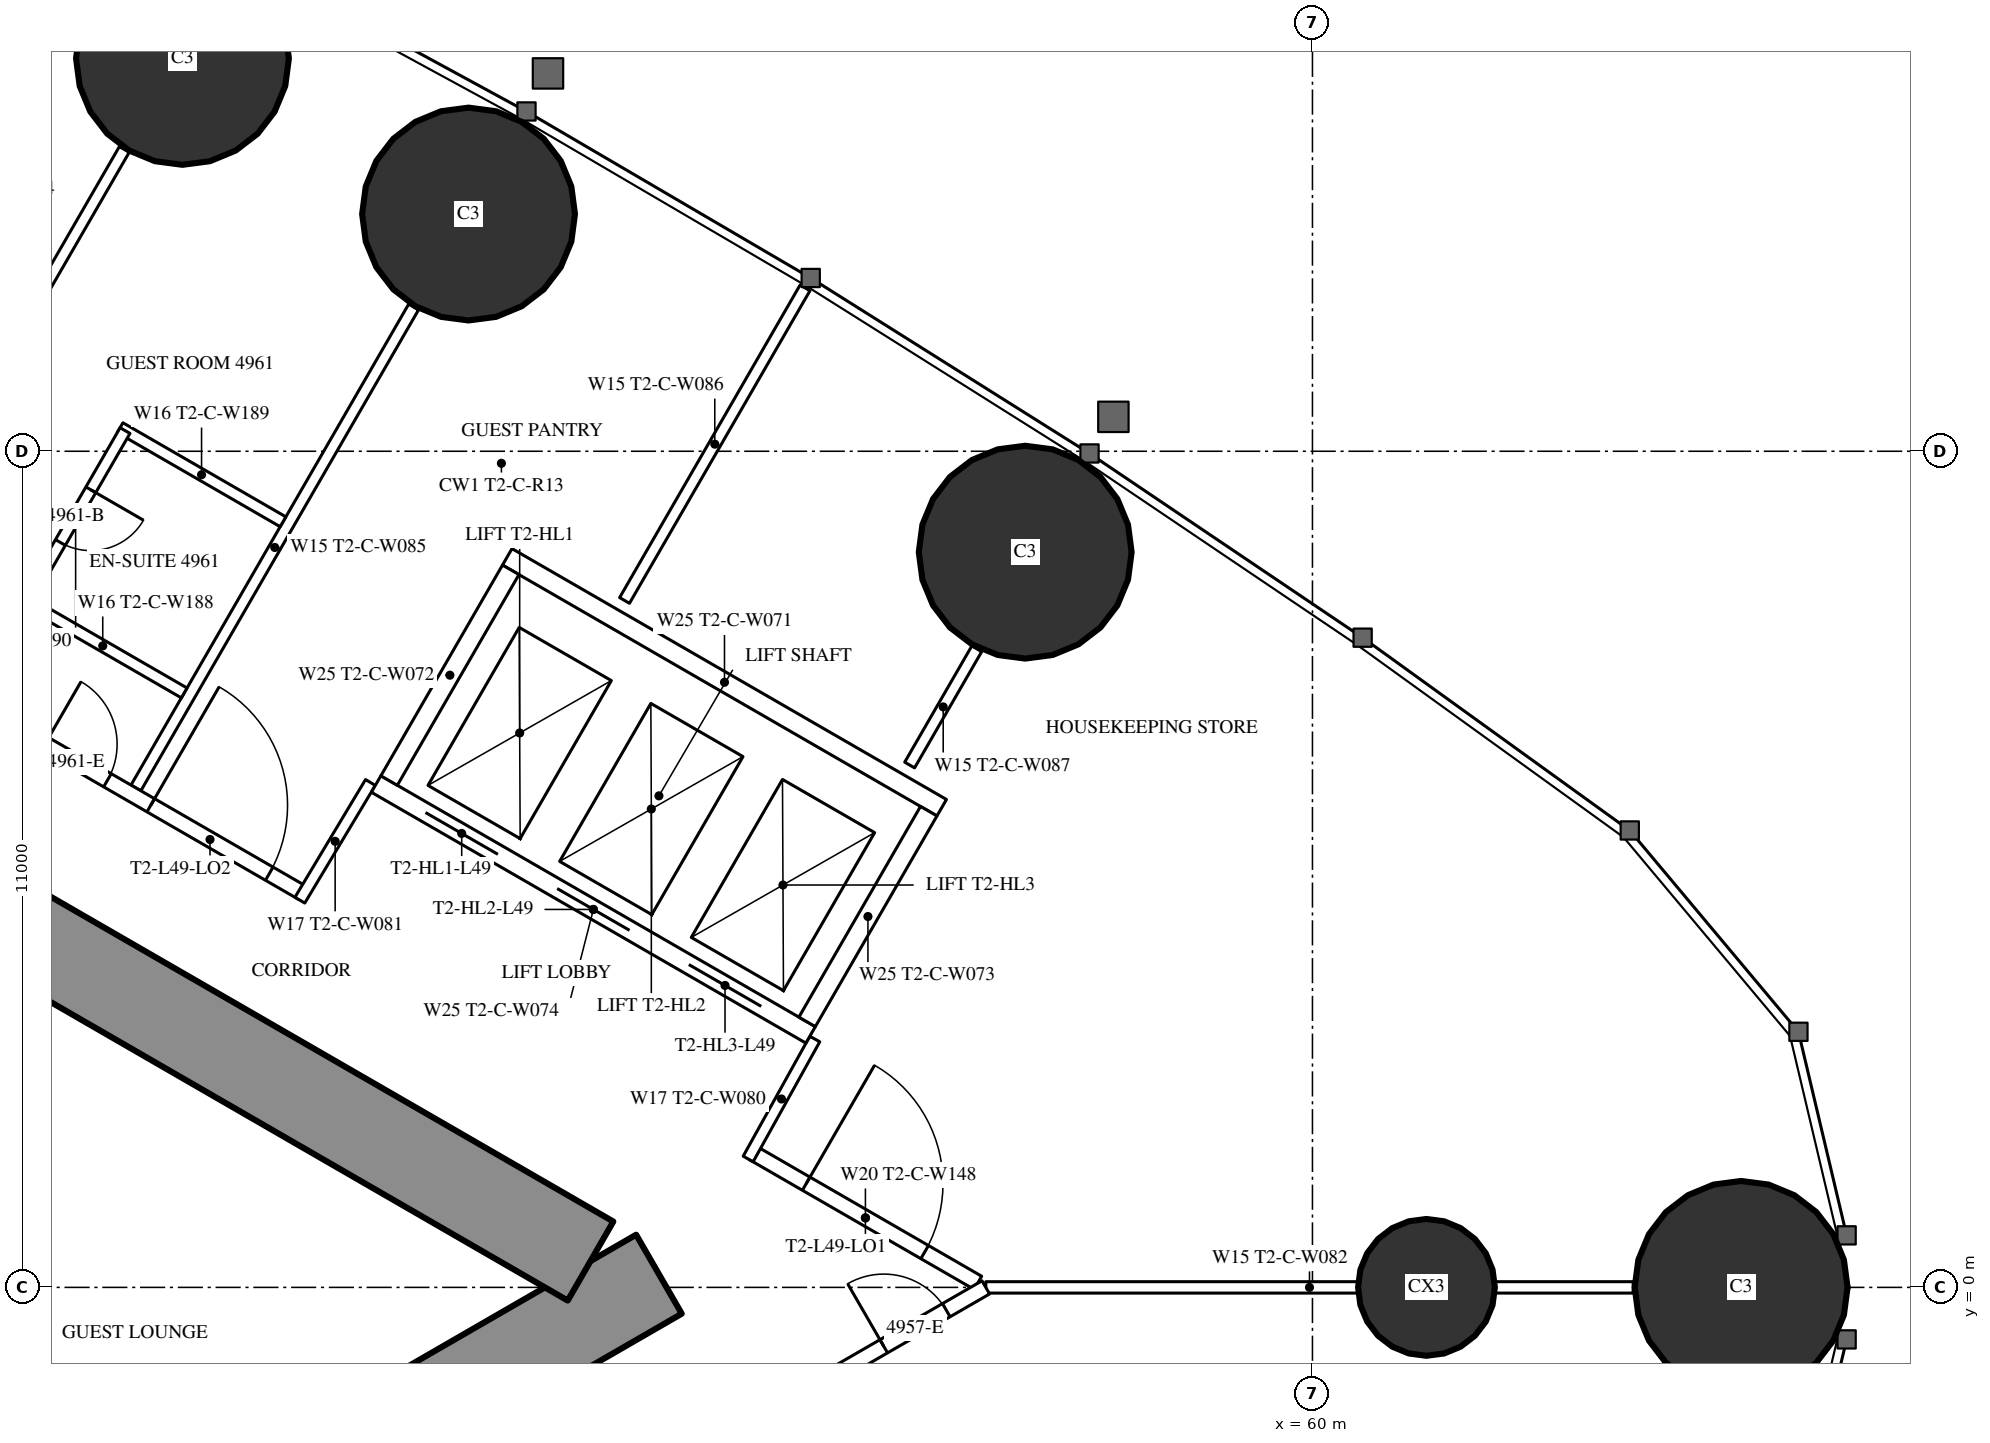
"""IFC4 building model, lengths in metres.
Left out: names, types, materials, properties, quantities, classifications, styles, units other than length and angle.
Written with IfcOpenShell. Run it as: python <this file> out.ifc"""

import sys

from ifc_helpers import new_model, si_unit, direction, frame, frame_2d, origin, origin_2d, place, context, subcontext, project, spatial, rectangle, circle, extrude, element, fill, save


model = new_model("IFC4")
c1 = context("Model", 3, precision=1e-05, world=origin(), true_north=direction((0.0, 1.0)))
c2 = subcontext(c1, "Body", "Model", "MODEL_VIEW")
j1 = project(units=[si_unit("LENGTHUNIT", "METRE"), si_unit("PLANEANGLEUNIT", "RADIAN")], contexts=[c1])
p1 = place(None, origin())
s1 = spatial("IfcSite", under=j1, at=p1, CompositionType="ELEMENT")
p2 = place(p1, origin())
s2 = spatial("IfcBuilding", under=s1, at=p2, CompositionType="ELEMENT")
p3 = place(p2, frame((0.0, 0.0, 184.3)))
s3 = spatial("IfcBuildingStorey", under=s2, at=p3, CompositionType="ELEMENT", Elevation=184.3)
for number, where, z_axis, x_axis in (
    (1, (65.64, 0.0, 0.0), (0.0, 0.0, 1.0), (1.0, 0.0, 0.0)),
    (2, (56.221, 9.672, 0.0), (0.0, 0.0, 1.0), (1.0, 0.0, 0.0)),
    (3, (48.897, 14.121, 0.0), (0.0, 0.0, 1.0), (1.0, 0.0, 0.0)),
    (4, (45.134, 16.168, 0.0), (0.0, 0.0, 1.0), (1.0, 0.0, 0.0)),
):
    element("IfcColumn", number, at=place(p3, frame(where, z_axis=z_axis, x_axis=x_axis)), inside=s3, PredefinedType="COLUMN", context=c2, shape_type="SweptSolid", body=[
        extrude(circle(Radius=1.4, at=origin_2d()), origin(), (0.0, 0.0, 1.0), 3.5),
    ])
p4 = place(p3, frame((61.5, 0.0, 0.0), z_axis=(0.0, 0.0, 1.0), x_axis=(1.0, 0.0, 0.0)))
e5 = element("IfcColumn", 5, at=p4, inside=s3, PredefinedType="COLUMN", context=c2, shape_type="SweptSolid", body=[
    extrude(circle(Radius=0.9, at=origin_2d()), origin(), (0.0, 0.0, 1.0), 3.5),
])
p5 = place(p3, frame((27.2, -13.8, 0.0), z_axis=(0.0, 0.0, 1.0), x_axis=(0.866027159892, 0.499996958321, 0.0)))
e6 = element("IfcWall", 6, at=p5, inside=s3, PredefinedType="SHEAR", context=c2, shape_type="SweptSolid", body=[
    extrude(rectangle(XDim=27.947, YDim=1.2, at=frame_2d((13.973, 0.0))), origin(), (0.0, 0.0, 1.0), 3.5),
])
p6 = place(p5, frame((4.6, 0.0, 0.0)))
e7 = element("IfcOpeningElement", 7, at=p6, cuts=e6, PredefinedType="OPENING", context=c2, shape_type="SweptSolid", body=[
    extrude(rectangle(XDim=1.0, YDim=2.2, at=frame_2d((0.5, 1.1))), frame((0.0, 0.61, 0.0), z_axis=(0.0, -1.0, 0.0), x_axis=(1.0, 0.0, 0.0)), (0.0, 0.0, 1.0), 1.22),
])
p7 = place(p5, frame((13.395, 0.0, 0.0)))
e8 = element("IfcOpeningElement", 8, at=p7, cuts=e6, PredefinedType="OPENING", context=c2, shape_type="SweptSolid", body=[
    extrude(rectangle(XDim=1.8, YDim=2.2, at=frame_2d((0.9, 1.1))), frame((0.0, 0.61, 0.0), z_axis=(0.0, -1.0, 0.0), x_axis=(1.0, 0.0, 0.0)), (0.0, 0.0, 1.0), 1.22),
])
p8 = place(p3, frame((27.2, 13.8, 0.0), z_axis=(0.0, 0.0, 1.0), x_axis=(0.866024515034, -0.500001539357, 0.0)))
e9 = element("IfcWall", 9, at=p8, inside=s3, PredefinedType="SHEAR", context=c2, shape_type="SweptSolid", body=[
    extrude(rectangle(XDim=26.907, YDim=1.2, at=frame_2d((13.454, 0.0))), origin(), (0.0, 0.0, 1.0), 3.5),
])
p9 = place(p8, frame((4.6, 0.0, 0.0)))
e10 = element("IfcOpeningElement", 10, at=p9, cuts=e9, PredefinedType="OPENING", context=c2, shape_type="SweptSolid", body=[
    extrude(rectangle(XDim=1.0, YDim=2.2, at=frame_2d((0.5, 1.1))), frame((0.0, 0.61, 0.0), z_axis=(0.0, -1.0, 0.0), x_axis=(1.0, 0.0, 0.0)), (0.0, 0.0, 1.0), 1.22),
])
p10 = place(p8, frame((13.395, 0.0, 0.0)))
e11 = element("IfcOpeningElement", 11, at=p10, cuts=e9, PredefinedType="OPENING", context=c2, shape_type="SweptSolid", body=[
    extrude(rectangle(XDim=1.8, YDim=2.2, at=frame_2d((0.9, 1.1))), frame((0.0, 0.61, 0.0), z_axis=(0.0, -1.0, 0.0), x_axis=(1.0, 0.0, 0.0)), (0.0, 0.0, 1.0), 1.22),
])
p11 = place(p3, frame((40.769, 8.737, 0.0), z_axis=(0.0, 0.0, 1.0), x_axis=(0.500013115284, 0.866017831539, 0.0)))
e12 = element("IfcWall", 12, at=p11, inside=s3, PredefinedType="PARTITIONING", context=c2, shape_type="SweptSolid", body=[
    extrude(rectangle(XDim=7.198, YDim=0.15, at=frame_2d((3.599, 0.0))), origin(), (0.0, 0.0, 1.0), 2.3),
])
p12 = place(p3, frame((44.521, 6.571, 0.0), z_axis=(0.0, 0.0, 1.0), x_axis=(0.500020376429, 0.866013639128, 0.0)))
e13 = element("IfcWall", 13, at=p12, inside=s3, PredefinedType="PARTITIONING", context=c2, shape_type="SweptSolid", body=[
    extrude(rectangle(XDim=7.306, YDim=0.15, at=frame_2d((3.653, 0.0))), origin(), (0.0, 0.0, 1.0), 2.3),
])
p13 = place(p3, frame((55.702, 0.0, 0.0), z_axis=(0.0, 0.0, 1.0), x_axis=(1.0, 0.0, 0.0)))
e14 = element("IfcWall", 14, at=p13, inside=s3, PredefinedType="PARTITIONING", context=c2, shape_type="SweptSolid", body=[
    extrude(rectangle(XDim=8.518, YDim=0.15, at=frame_2d((4.259, 0.0))), origin(), (0.0, 0.0, 1.0), 2.3),
])
p14 = place(p3, frame((50.95, 9.037, 0.0), z_axis=(0.0, 0.0, 1.0), x_axis=(0.499988022762, 0.866032318735, 0.0)))
e15 = element("IfcWall", 15, at=p14, inside=s3, PredefinedType="PARTITIONING", context=c2, shape_type="SweptSolid", body=[
    extrude(rectangle(XDim=4.748, YDim=0.15, at=frame_2d((2.374, 0.0))), origin(), (0.0, 0.0, 1.0), 3.25),
])
p15 = place(p3, frame((54.7, 6.872, 0.0), z_axis=(0.0, 0.0, 1.0), x_axis=(0.499989690894, 0.866031355668, 0.0)))
e16 = element("IfcWall", 16, at=p15, inside=s3, PredefinedType="PARTITIONING", context=c2, shape_type="SweptSolid", body=[
    extrude(rectangle(XDim=1.766, YDim=0.15, at=frame_2d((0.883, 0.0))), origin(), (0.0, 0.0, 1.0), 3.25),
])
p16 = place(p3, frame((27.959, 16.017, 0.0), z_axis=(0.0, 0.0, 1.0), x_axis=(0.866027146794, -0.499996981007, 0.0)))
e17 = element("IfcWall", 17, at=p16, inside=s3, PredefinedType="PARTITIONING", context=c2, shape_type="SweptSolid", body=[
    extrude(rectangle(XDim=21.657, YDim=0.2, at=frame_2d((10.829, 0.0))), origin(), (0.0, 0.0, 1.0), 3.25),
])
p17 = place(p16, frame((17.741, 0.0, 0.0)))
e18 = element("IfcOpeningElement", 18, at=p17, cuts=e17, PredefinedType="OPENING", context=c2, shape_type="SweptSolid", body=[
    extrude(rectangle(XDim=0.95, YDim=2.2, at=frame_2d((0.475, 1.1))), frame((0.0, 0.11, 0.0), z_axis=(0.0, -1.0, 0.0), x_axis=(1.0, 0.0, 0.0)), (0.0, 0.0, 1.0), 0.22),
])
p18 = place(p16, frame((10.782, 0.0, 0.0)))
e19 = element("IfcOpeningElement", 19, at=p18, cuts=e17, PredefinedType="OPENING", context=c2, shape_type="SweptSolid", body=[
    extrude(rectangle(XDim=0.95, YDim=2.2, at=frame_2d((0.475, 1.1))), frame((0.0, 0.11, 0.0), z_axis=(0.0, -1.0, 0.0), x_axis=(1.0, 0.0, 0.0)), (0.0, 0.0, 1.0), 0.22),
])
p19 = place(p16, frame((6.732, 0.0, 0.0)))
e20 = element("IfcOpeningElement", 20, at=p19, cuts=e17, PredefinedType="OPENING", context=c2, shape_type="SweptSolid", body=[
    extrude(rectangle(XDim=0.95, YDim=2.2, at=frame_2d((0.475, 1.1))), frame((0.0, 0.11, 0.0), z_axis=(0.0, -1.0, 0.0), x_axis=(1.0, 0.0, 0.0)), (0.0, 0.0, 1.0), 0.22),
])
p20 = place(p16, frame((19.349, 0.0, 0.0)))
e21 = element("IfcOpeningElement", 21, at=p20, cuts=e17, PredefinedType="OPENING", context=c2, shape_type="SweptSolid", body=[
    extrude(rectangle(XDim=1.8, YDim=2.2, at=frame_2d((0.9, 1.1))), frame((0.0, 0.11, 0.0), z_axis=(0.0, -1.0, 0.0), x_axis=(1.0, 0.0, 0.0)), (0.0, 0.0, 1.0), 0.22),
])
p21 = place(p3, frame((52.639, 1.769, 0.0), z_axis=(0.0, 0.0, 1.0), x_axis=(0.866027340901, -0.4999966448, 0.0)))
e22 = element("IfcWall", 22, at=p21, inside=s3, PredefinedType="PARTITIONING", context=c2, shape_type="SweptSolid", body=[
    extrude(rectangle(XDim=3.417, YDim=0.2, at=frame_2d((1.708, 0.0))), origin(), (0.0, 0.0, 1.0), 3.25),
])
p22 = place(p21, frame((0.809, 0.0, 0.0)))
e23 = element("IfcOpeningElement", 23, at=p22, cuts=e22, PredefinedType="OPENING", context=c2, shape_type="SweptSolid", body=[
    extrude(rectangle(XDim=1.8, YDim=2.2, at=frame_2d((0.9, 1.1))), frame((0.0, 0.11, 0.0), z_axis=(0.0, -1.0, 0.0), x_axis=(1.0, 0.0, 0.0)), (0.0, 0.0, 1.0), 0.22),
])
for number, where, z_axis, x_axis in (
    (24, (52.576, 1.689, 0.0), (0.0, 0.0, 1.0), (0.485, 0.874, 0.0)),
    (25, (47.606, 6.643, 0.0), (0.0, 0.0, 1.0), (-0.514, -0.858, 0.0)),
):
    element("IfcWall", number, at=place(p3, frame(where, z_axis=z_axis, x_axis=x_axis)), inside=s3, PredefinedType="PARTITIONING", context=c2, shape_type="SweptSolid", body=[
        extrude(rectangle(XDim=1.805, YDim=0.15, at=frame_2d((0.902, 0.0))), origin(), (0.0, 0.0, 1.0), 3.25),
    ])
p23 = place(p3, frame((51.997, -2.139, 0.0), z_axis=(0.0, 0.0, 1.0), x_axis=(0.866036399848, 0.499980953776, 0.0)))
e26 = element("IfcWall", 26, at=p23, inside=s3, PredefinedType="PARTITIONING", context=c2, shape_type="SweptSolid", body=[
    extrude(rectangle(XDim=4.279, YDim=0.2, at=frame_2d((2.139, 0.0))), origin(), (0.0, 0.0, 1.0), 3.25),
])
p24 = place(p23, frame((2.729, 0.0, 0.0)))
e27 = element("IfcOpeningElement", 27, at=p24, cuts=e26, PredefinedType="OPENING", context=c2, shape_type="SweptSolid", body=[
    extrude(rectangle(XDim=0.95, YDim=2.2, at=frame_2d((0.475, 1.1))), frame((0.0, 0.11, 0.0), z_axis=(0.0, -1.0, 0.0), x_axis=(1.0, 0.0, 0.0)), (0.0, 0.0, 1.0), 0.22),
])
p25 = place(p3, frame((44.313, 11.31, 0.0), z_axis=(0.0, 0.0, 1.0), x_axis=(0.866031185235, -0.4999899861, 0.0)))
e28 = element("IfcWall", 28, at=p25, inside=s3, PredefinedType="PARTITIONING", context=c2, shape_type="SweptSolid", body=[
    extrude(rectangle(XDim=2.475, YDim=0.15, at=frame_2d((1.238, 0.0))), origin(), (0.0, 0.0, 1.0), 3.25),
])
p26 = place(p3, frame((43.078, 9.021, 0.0), z_axis=(0.0, 0.0, 1.0), x_axis=(0.49997716683, 0.86603858612, 0.0)))
e29 = element("IfcWall", 29, at=p26, inside=s3, PredefinedType="PARTITIONING", context=c2, shape_type="SweptSolid", body=[
    extrude(rectangle(XDim=2.6, YDim=0.15, at=frame_2d((1.3, 0.0))), origin(), (0.0, 0.0, 1.0), 3.25),
])
p27 = place(p26, frame((0.9, 0.0, 0.0)))
e30 = element("IfcOpeningElement", 30, at=p27, cuts=e29, PredefinedType="OPENING", context=c2, shape_type="SweptSolid", body=[
    extrude(rectangle(XDim=0.8, YDim=2.2, at=frame_2d((0.4, 1.1))), frame((0.0, 0.085, 0.0), z_axis=(0.0, -1.0, 0.0), x_axis=(1.0, 0.0, 0.0)), (0.0, 0.0, 1.0), 0.17),
])
p28 = place(p3, frame((43.013, 9.058, 0.0), z_axis=(0.0, 0.0, 1.0), x_axis=(0.866006523861, -0.500032699561, 0.0)))
e31 = element("IfcWall", 31, at=p28, inside=s3, PredefinedType="PARTITIONING", context=c2, shape_type="SweptSolid", body=[
    extrude(rectangle(XDim=2.475, YDim=0.15, at=frame_2d((1.237, 0.0))), origin(), (0.0, 0.0, 1.0), 2.45),
])
p29 = place(p3, frame((47.681, 6.622, 0.0), z_axis=(0.0, 0.0, 1.0), x_axis=(0.86603344179, -0.499986077507, 0.0)))
e32 = element("IfcWall", 32, at=p29, inside=s3, PredefinedType="PARTITIONING", context=c2, shape_type="SweptSolid", body=[
    extrude(rectangle(XDim=6.6, YDim=0.25, at=frame_2d((3.3, 0.0))), origin(), (0.0, 0.0, 1.0), 3.25),
])
p30 = place(p29, frame((0.75, 0.0, 0.0)))
e33 = element("IfcOpeningElement", 33, at=p30, cuts=e32, PredefinedType="OPENING", context=c2, shape_type="SweptSolid", body=[
    extrude(rectangle(XDim=1.1, YDim=2.2, at=frame_2d((0.55, 1.1))), frame((0.0, 0.135, 0.0), z_axis=(0.0, -1.0, 0.0), x_axis=(1.0, 0.0, 0.0)), (0.0, 0.0, 1.0), 0.27),
])
p31 = place(p29, frame((2.75, 0.0, 0.0)))
e34 = element("IfcOpeningElement", 34, at=p31, cuts=e32, PredefinedType="OPENING", context=c2, shape_type="SweptSolid", body=[
    extrude(rectangle(XDim=1.1, YDim=2.2, at=frame_2d((0.55, 1.1))), frame((0.0, 0.135, 0.0), z_axis=(0.0, -1.0, 0.0), x_axis=(1.0, 0.0, 0.0)), (0.0, 0.0, 1.0), 0.27),
])
p32 = place(p29, frame((4.75, 0.0, 0.0)))
e35 = element("IfcOpeningElement", 35, at=p32, cuts=e32, PredefinedType="OPENING", context=c2, shape_type="SweptSolid", body=[
    extrude(rectangle(XDim=1.1, YDim=2.2, at=frame_2d((0.55, 1.1))), frame((0.0, 0.135, 0.0), z_axis=(0.0, -1.0, 0.0), x_axis=(1.0, 0.0, 0.0)), (0.0, 0.0, 1.0), 0.27),
])
p33 = place(p3, frame((49.406, 9.611, 0.0), z_axis=(0.0, 0.0, 1.0), x_axis=(0.86603344179, -0.499986077507, 0.0)))
e36 = element("IfcWall", 36, at=p33, inside=s3, PredefinedType="PARTITIONING", context=c2, shape_type="SweptSolid", body=[
    extrude(rectangle(XDim=6.6, YDim=0.25, at=frame_2d((3.3, 0.0))), origin(), (0.0, 0.0, 1.0), 3.25),
])
p34 = place(p3, frame((47.852, 6.668, 0.0), z_axis=(0.0, 0.0, 1.0), x_axis=(0.499929347863, 0.866066190972, 0.0)))
e37 = element("IfcWall", 37, at=p34, inside=s3, PredefinedType="PARTITIONING", context=c2, shape_type="SweptSolid", body=[
    extrude(rectangle(XDim=3.201, YDim=0.25, at=frame_2d((1.6, 0.0))), origin(), (0.0, 0.0, 1.0), 3.25),
])
p35 = place(p3, frame((53.352, 3.493, 0.0), z_axis=(0.0, 0.0, 1.0), x_axis=(0.499872130319, 0.866099216793, 0.0)))
e38 = element("IfcWall", 38, at=p35, inside=s3, PredefinedType="PARTITIONING", context=c2, shape_type="SweptSolid", body=[
    extrude(rectangle(XDim=3.2, YDim=0.25, at=frame_2d((1.6, 0.0))), origin(), (0.0, 0.0, 1.0), 3.25),
])
p36 = place(p24, origin())
e39 = element("IfcDoor", 39, at=p36, inside=s3, OperationType="SINGLE_SWING_LEFT", PredefinedType="DOOR", context=c2, shape_type="SweptSolid", body=[
    extrude(rectangle(XDim=0.95, YDim=2.2, at=frame_2d((0.475, 1.1))), frame((0.0, 0.025, 0.0), z_axis=(0.0, -1.0, 0.0), x_axis=(1.0, 0.0, 0.0)), (0.0, 0.0, 1.0), 0.05),
])
fill(e27, e39)
p37 = place(p27, origin())
e40 = element("IfcDoor", 40, at=p37, inside=s3, OperationType="SINGLE_SWING_RIGHT", PredefinedType="DOOR", context=c2, shape_type="SweptSolid", body=[
    extrude(rectangle(XDim=0.8, YDim=2.2, at=frame_2d((0.4, 1.1))), frame((0.0, 0.025, 0.0), z_axis=(0.0, -1.0, 0.0), x_axis=(1.0, 0.0, 0.0)), (0.0, 0.0, 1.0), 0.05),
])
fill(e30, e40)
p38 = place(p17, origin())
e41 = element("IfcDoor", 41, at=p38, inside=s3, OperationType="SINGLE_SWING_LEFT", PredefinedType="DOOR", context=c2, shape_type="SweptSolid", body=[
    extrude(rectangle(XDim=0.95, YDim=2.2, at=frame_2d((0.475, 1.1))), frame((0.0, 0.025, 0.0), z_axis=(0.0, -1.0, 0.0), x_axis=(1.0, 0.0, 0.0)), (0.0, 0.0, 1.0), 0.05),
])
fill(e18, e41)
p39 = place(p22, origin())
e42 = element("IfcDoor", 42, at=p39, inside=s3, OperationType="DOUBLE_DOOR_SINGLE_SWING", PredefinedType="DOOR", context=c2, shape_type="SweptSolid", body=[
    extrude(rectangle(XDim=1.8, YDim=2.2, at=frame_2d((0.9, 1.1))), frame((0.0, 0.025, 0.0), z_axis=(0.0, -1.0, 0.0), x_axis=(1.0, 0.0, 0.0)), (0.0, 0.0, 1.0), 0.05),
])
fill(e23, e42)
p40 = place(p20, origin())
e43 = element("IfcDoor", 43, at=p40, inside=s3, OperationType="DOUBLE_DOOR_SINGLE_SWING", PredefinedType="DOOR", context=c2, shape_type="SweptSolid", body=[
    extrude(rectangle(XDim=1.8, YDim=2.2, at=frame_2d((0.9, 1.1))), frame((0.0, 0.025, 0.0), z_axis=(0.0, -1.0, 0.0), x_axis=(1.0, 0.0, 0.0)), (0.0, 0.0, 1.0), 0.05),
])
fill(e21, e43)
p41 = place(p30, origin())
e44 = element("IfcDoor", 44, at=p41, inside=s3, OperationType="DOUBLE_DOOR_SLIDING", PredefinedType="USERDEFINED", context=c2, shape_type="SweptSolid", body=[
    extrude(rectangle(XDim=1.1, YDim=2.2, at=frame_2d((0.55, 1.1))), frame((0.0, 0.025, 0.0), z_axis=(0.0, -1.0, 0.0), x_axis=(1.0, 0.0, 0.0)), (0.0, 0.0, 1.0), 0.05),
])
fill(e33, e44)
p42 = place(p31, origin())
e45 = element("IfcDoor", 45, at=p42, inside=s3, OperationType="DOUBLE_DOOR_SLIDING", PredefinedType="USERDEFINED", context=c2, shape_type="SweptSolid", body=[
    extrude(rectangle(XDim=1.1, YDim=2.2, at=frame_2d((0.55, 1.1))), frame((0.0, 0.025, 0.0), z_axis=(0.0, -1.0, 0.0), x_axis=(1.0, 0.0, 0.0)), (0.0, 0.0, 1.0), 0.05),
])
fill(e34, e45)
p43 = place(p32, origin())
e46 = element("IfcDoor", 46, at=p43, inside=s3, OperationType="DOUBLE_DOOR_SLIDING", PredefinedType="USERDEFINED", context=c2, shape_type="SweptSolid", body=[
    extrude(rectangle(XDim=1.1, YDim=2.2, at=frame_2d((0.55, 1.1))), frame((0.0, 0.025, 0.0), z_axis=(0.0, -1.0, 0.0), x_axis=(1.0, 0.0, 0.0)), (0.0, 0.0, 1.0), 0.05),
])
fill(e35, e46)
save(model, sys.argv[1])
